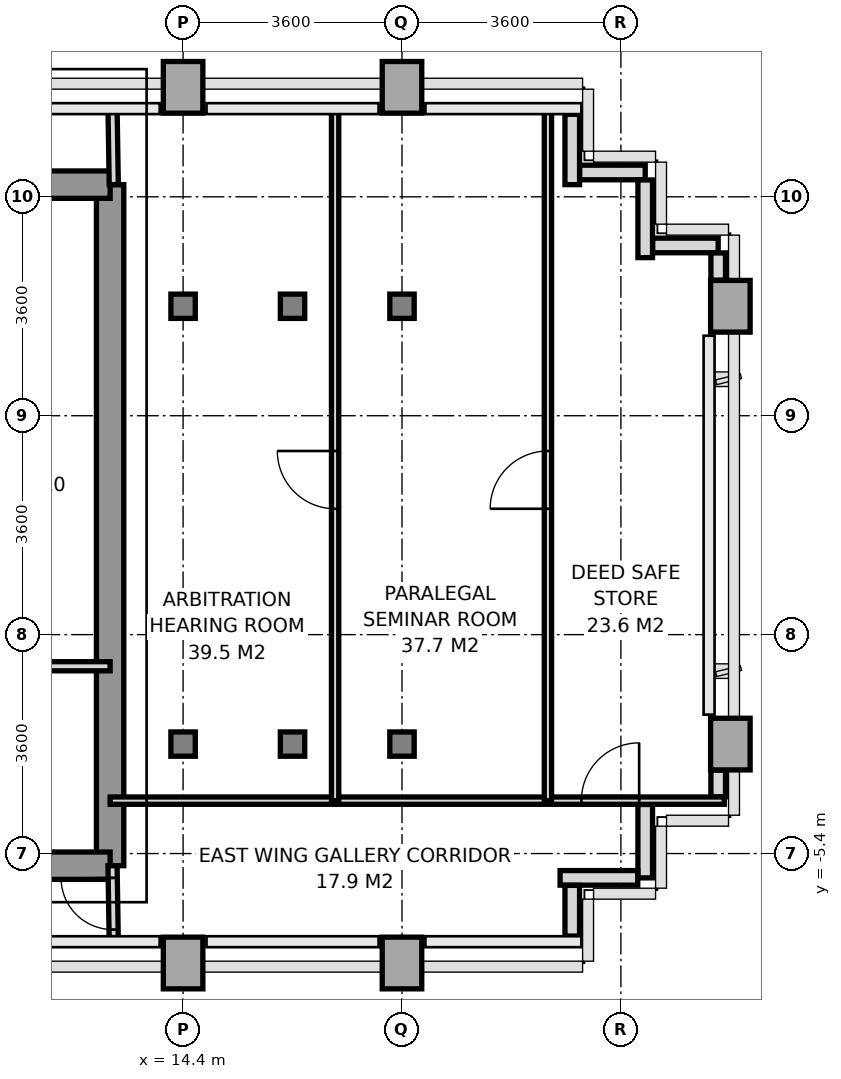
"""IFC4 building model, lengths in metres.
Left out: names, types, materials, properties, quantities, classifications, styles, units other than length and angle.
Written with IfcOpenShell. Run it as: python <this file> out.ifc"""

import sys

from ifc_helpers import new_model, si_unit, direction, frame, frame_2d, origin, origin_2d, place, context, subcontext, project, spatial, rectangle, i_section, extrude, source, transform, mapped, element, fill, save


model = new_model("IFC4")
c1 = context("Model", 3, precision=1e-05, world=origin(), true_north=direction((0.0, 1.0)))
c2 = subcontext(c1, "Body", "Model", "MODEL_VIEW")
j1 = project(units=[si_unit("LENGTHUNIT", "METRE"), si_unit("PLANEANGLEUNIT", "RADIAN")], contexts=[c1])
p1 = place(None, origin())
s1 = spatial("IfcSite", under=j1, at=p1, CompositionType="ELEMENT")
p2 = place(p1, origin())
s2 = spatial("IfcBuilding", under=s1, at=p2, CompositionType="ELEMENT")
p3 = place(p2, frame((0.0, 0.0, 134.6)))
s3 = spatial("IfcBuildingStorey", under=s2, at=p3, CompositionType="ELEMENT", Elevation=134.6)
m1 = source(origin(), c2, "Body", "SweptSolid", [
    extrude(rectangle(XDim=0.65, YDim=0.85, at=origin_2d()), origin(), (0.0, 0.0, 1.0), 3.2),
])
p4 = place(p3, frame((14.4, -7.2, 0.0), z_axis=(0.0, 0.0, 1.0), x_axis=(1.0, 0.0, 0.0)))
e1 = element("IfcColumn", 1, at=p4, inside=s3, PredefinedType="COLUMN", context=c2, shape_type="MappedRepresentation", body=[
    mapped(m1, transform((0.0, 0.0, 0.0), x_axis=(1.0, 0.0, 0.0), y_axis=(0.0, 1.0, 0.0), z_axis=(0.0, 0.0, 1.0), scale=1.0)),
])
m2 = source(origin(), c2, "Body", "SweptSolid", [
    extrude(i_section(OverallWidth=0.401, OverallDepth=0.399, WebThickness=0.02, FlangeThickness=0.032, at=origin_2d()), origin(), (0.0, 0.0, 1.0), 3.2),
])
for number, where, z_axis, x_axis in (
    (2, (14.4, -3.6, 0.0), (0.0, 0.0, 1.0), (1.0, 0.0, 0.0)),
    (3, (14.4, 3.6, 0.0), (0.0, 0.0, 1.0), (1.0, 0.0, 0.0)),
):
    element("IfcColumn", number, at=place(p3, frame(where, z_axis=z_axis, x_axis=x_axis)), inside=s3, PredefinedType="COLUMN", context=c2, shape_type="MappedRepresentation", body=[
        mapped(m2, transform((0.0, 0.0, 0.0), x_axis=(1.0, 0.0, 0.0), y_axis=(0.0, 1.0, 0.0), z_axis=(0.0, 0.0, 1.0), scale=1.0)),
    ])
p5 = place(p3, frame((14.4, 7.2, 0.0), z_axis=(0.0, 0.0, 1.0), x_axis=(1.0, 0.0, 0.0)))
e4 = element("IfcColumn", 4, at=p5, inside=s3, PredefinedType="COLUMN", context=c2, shape_type="MappedRepresentation", body=[
    mapped(m1, transform((0.0, 0.0, 0.0), x_axis=(1.0, 0.0, 0.0), y_axis=(0.0, 1.0, 0.0), z_axis=(0.0, 0.0, 1.0), scale=1.0)),
])
for number, where, z_axis, x_axis in (
    (5, (16.2, -3.6, 0.0), (0.0, 0.0, 1.0), (1.0, 0.0, 0.0)),
    (6, (16.2, 3.6, 0.0), (0.0, 0.0, 1.0), (1.0, 0.0, 0.0)),
):
    element("IfcColumn", number, at=place(p3, frame(where, z_axis=z_axis, x_axis=x_axis)), inside=s3, PredefinedType="COLUMN", context=c2, shape_type="MappedRepresentation", body=[
        mapped(m2, transform((0.0, 0.0, 0.0), x_axis=(1.0, 0.0, 0.0), y_axis=(0.0, 1.0, 0.0), z_axis=(0.0, 0.0, 1.0), scale=1.0)),
    ])
p6 = place(p3, frame((18.0, -7.2, 0.0), z_axis=(0.0, 0.0, 1.0), x_axis=(1.0, 0.0, 0.0)))
e7 = element("IfcColumn", 7, at=p6, inside=s3, PredefinedType="COLUMN", context=c2, shape_type="MappedRepresentation", body=[
    mapped(m1, transform((0.0, 0.0, 0.0), x_axis=(1.0, 0.0, 0.0), y_axis=(0.0, 1.0, 0.0), z_axis=(0.0, 0.0, 1.0), scale=1.0)),
])
for number, where, z_axis, x_axis in (
    (8, (18.0, -3.6, 0.0), (0.0, 0.0, 1.0), (1.0, 0.0, 0.0)),
    (9, (18.0, 3.6, 0.0), (0.0, 0.0, 1.0), (1.0, 0.0, 0.0)),
):
    element("IfcColumn", number, at=place(p3, frame(where, z_axis=z_axis, x_axis=x_axis)), inside=s3, PredefinedType="COLUMN", context=c2, shape_type="MappedRepresentation", body=[
        mapped(m2, transform((0.0, 0.0, 0.0), x_axis=(1.0, 0.0, 0.0), y_axis=(0.0, 1.0, 0.0), z_axis=(0.0, 0.0, 1.0), scale=1.0)),
    ])
for number, where, z_axis, x_axis in (
    (10, (18.0, 7.2, 0.0), (0.0, 0.0, 1.0), (1.0, 0.0, 0.0)),
    (11, (23.4, -3.6, 0.0), (0.0, 0.0, 1.0), (1.0, 0.0, 0.0)),
    (12, (23.4, 3.6, 0.0), (0.0, 0.0, 1.0), (1.0, 0.0, 0.0)),
):
    element("IfcColumn", number, at=place(p3, frame(where, z_axis=z_axis, x_axis=x_axis)), inside=s3, PredefinedType="COLUMN", context=c2, shape_type="MappedRepresentation", body=[
        mapped(m1, transform((0.0, 0.0, 0.0), x_axis=(1.0, 0.0, 0.0), y_axis=(0.0, 1.0, 0.0), z_axis=(0.0, 0.0, 1.0), scale=1.0)),
    ])
p7 = place(p3, frame((22.0, -4.593, 0.0), z_axis=(0.0, 0.0, 1.0), x_axis=(0.0, -1.0, 0.0)))
e13 = element("IfcWall", 13, at=p7, inside=s3, PredefinedType="PARAPET", context=c2, shape_type="SweptSolid", body=[
    extrude(rectangle(XDim=1.207, YDim=0.24, at=frame_2d((0.604, 0.0))), origin(), (0.0, 0.0, 1.0), 1.15),
])
p8 = place(p3, frame((21.877, -5.8, 0.0), z_axis=(0.0, 0.0, 1.0), x_axis=(-1.0, 0.0, 0.0)))
e14 = element("IfcWall", 14, at=p8, inside=s3, PredefinedType="PARAPET", context=c2, shape_type="SweptSolid", body=[
    extrude(rectangle(XDim=1.277, YDim=0.24, at=frame_2d((0.638, 0.0))), origin(), (0.0, 0.0, 1.0), 1.15),
])
p9 = place(p3, frame((20.8, -5.923, 0.0), z_axis=(0.0, 0.0, 1.0), x_axis=(0.0, -1.0, 0.0)))
e15 = element("IfcWall", 15, at=p9, inside=s3, PredefinedType="PARAPET", context=c2, shape_type="SweptSolid", body=[
    extrude(rectangle(XDim=0.834, YDim=0.24, at=frame_2d((0.417, 0.0))), origin(), (0.0, 0.0, 1.0), 1.15),
])
p10 = place(p3, frame((20.8, 6.757, 0.0), z_axis=(0.0, 0.0, 1.0), x_axis=(0.0, -1.0, 0.0)))
e16 = element("IfcWall", 16, at=p10, inside=s3, PredefinedType="PARAPET", context=c2, shape_type="SweptSolid", body=[
    extrude(rectangle(XDim=1.157, YDim=0.24, at=frame_2d((0.579, 0.0))), origin(), (0.0, 0.0, 1.0), 1.15),
])
p11 = place(p3, frame((20.923, 5.8, 0.0), z_axis=(0.0, 0.0, 1.0), x_axis=(1.0, 0.0, 0.0)))
e17 = element("IfcWall", 17, at=p11, inside=s3, PredefinedType="PARAPET", context=c2, shape_type="SweptSolid", body=[
    extrude(rectangle(XDim=1.077, YDim=0.24, at=frame_2d((0.539, 0.0))), origin(), (0.0, 0.0, 1.0), 1.15),
])
p12 = place(p3, frame((22.0, 5.677, 0.0), z_axis=(0.0, 0.0, 1.0), x_axis=(0.0, -1.0, 0.0)))
e18 = element("IfcWall", 18, at=p12, inside=s3, PredefinedType="PARAPET", context=c2, shape_type="SweptSolid", body=[
    extrude(rectangle(XDim=1.277, YDim=0.24, at=frame_2d((0.639, 0.0))), origin(), (0.0, 0.0, 1.0), 1.15),
])
p13 = place(p3, frame((22.123, 4.6, 0.0), z_axis=(0.0, 0.0, 1.0), x_axis=(1.0, 0.0, 0.0)))
e19 = element("IfcWall", 19, at=p13, inside=s3, PredefinedType="PARAPET", context=c2, shape_type="SweptSolid", body=[
    extrude(rectangle(XDim=1.077, YDim=0.24, at=frame_2d((0.539, 0.0))), origin(), (0.0, 0.0, 1.0), 1.15),
])
p14 = place(p3, frame((23.2, 4.477, 0.0), z_axis=(0.0, 0.0, 1.0), x_axis=(0.0, -1.0, 0.0)))
e20 = element("IfcWall", 20, at=p14, inside=s3, PredefinedType="PARAPET", context=c2, shape_type="SweptSolid", body=[
    extrude(rectangle(XDim=0.449, YDim=0.24, at=frame_2d((0.225, 0.0))), origin(), (0.0, 0.0, 1.0), 1.15),
])
p15 = place(p3, frame((23.2, -4.028, 0.0), z_axis=(0.0, 0.0, 1.0), x_axis=(0.0, -1.0, 0.0)))
e21 = element("IfcWall", 21, at=p15, inside=s3, PredefinedType="PARAPET", context=c2, shape_type="SweptSolid", body=[
    extrude(rectangle(XDim=0.439, YDim=0.24, at=frame_2d((0.219, 0.0))), origin(), (0.0, 0.0, 1.0), 1.15),
])
p16 = place(p3, frame((13.2, -5.6, 0.0), z_axis=(0.0, 0.0, 1.0), x_axis=(0.0, 1.0, 0.0)))
e22 = element("IfcWall", 22, at=p16, inside=s3, PredefinedType="SHEAR", context=c2, shape_type="SweptSolid", body=[
    extrude(rectangle(XDim=11.2, YDim=0.45, at=frame_2d((5.6, 0.0))), origin(), (0.0, 0.0, 1.0), 3.2),
])
p17 = place(p3, frame((11.381, 5.6, 0.0), z_axis=(0.0, 0.0, 1.0), x_axis=(1.0, 0.0, 0.0)))
e23 = element("IfcWall", 23, at=p17, inside=s3, PredefinedType="SHEAR", context=c2, shape_type="SweptSolid", body=[
    extrude(rectangle(XDim=1.819, YDim=0.45, at=frame_2d((0.909, 0.0))), origin(), (0.0, 0.0, 1.0), 3.2),
])
p18 = place(p3, frame((5.4, -5.6, 0.0), z_axis=(0.0, 0.0, 1.0), x_axis=(1.0, 0.0, 0.0)))
e24 = element("IfcWall", 24, at=p18, inside=s3, PredefinedType="SHEAR", context=c2, shape_type="SweptSolid", body=[
    extrude(rectangle(XDim=7.8, YDim=0.45, at=frame_2d((3.9, 0.0))), origin(), (0.0, 0.0, 1.0), 3.2),
])
p19 = place(p18, frame((3.0, 0.0, 0.0)))
e25 = element("IfcOpeningElement", 25, at=p19, cuts=e24, PredefinedType="OPENING", context=c2, shape_type="SweptSolid", body=[
    extrude(rectangle(XDim=1.2, YDim=2.2, at=frame_2d((0.6, 1.1))), frame((0.0, 0.235, 0.0), z_axis=(0.0, -1.0, 0.0), x_axis=(1.0, 0.0, 0.0)), (0.0, 0.0, 1.0), 0.47),
])
p20 = place(p18, frame((5.85, 0.0, 0.0)))
e26 = element("IfcOpeningElement", 26, at=p20, cuts=e24, PredefinedType="OPENING", context=c2, shape_type="SweptSolid", body=[
    extrude(rectangle(XDim=0.8, YDim=2.1, at=frame_2d((0.4, 1.05))), frame((0.0, 0.235, 0.0), z_axis=(0.0, -1.0, 0.0), x_axis=(1.0, 0.0, 0.0)), (0.0, 0.0, 1.0), 0.47),
])
p21 = place(p3, frame((11.02, -2.32, 0.0), z_axis=(0.0, 0.0, 1.0), x_axis=(1.0, 0.0, 0.0)))
e27 = element("IfcWall", 27, at=p21, inside=s3, PredefinedType="PARTITIONING", context=c2, shape_type="SweptSolid", body=[
    extrude(rectangle(XDim=2.18, YDim=0.15, at=frame_2d((1.09, 0.0))), origin(), (0.0, 0.0, 1.0), 3.2),
])
p22 = place(p3, frame((13.26, 5.6, 0.0), z_axis=(0.0, 0.0, 1.0), x_axis=(-0.016013571389, 0.999871774545, 0.0)))
e28 = element("IfcWall", 28, at=p22, inside=s3, PredefinedType="PARTITIONING", context=c2, shape_type="SweptSolid", body=[
    extrude(rectangle(XDim=1.25, YDim=0.15, at=frame_2d((0.625, 0.0))), origin(), (0.0, 0.0, 1.0), 3.2),
])
p23 = place(p3, frame((13.26, -6.85, 0.0), z_axis=(0.0, 0.0, 1.0), x_axis=(-0.016013571389, 0.999871774545, 0.0)))
e29 = element("IfcWall", 29, at=p23, inside=s3, PredefinedType="PARTITIONING", context=c2, shape_type="SweptSolid", body=[
    extrude(rectangle(XDim=1.25, YDim=0.15, at=frame_2d((0.625, 0.0))), origin(), (0.0, 0.0, 1.0), 3.2),
])
p24 = place(p23, frame((0.2, 0.0, 0.0)))
e30 = element("IfcOpeningElement", 30, at=p24, cuts=e29, PredefinedType="OPENING", context=c2, shape_type="SweptSolid", body=[
    extrude(rectangle(XDim=0.85, YDim=2.1, at=frame_2d((0.425, 1.05))), frame((0.0, 0.085, 0.0), z_axis=(0.0, -1.0, 0.0), x_axis=(1.0, 0.0, 0.0)), (0.0, 0.0, 1.0), 0.17),
])
p25 = place(p3, frame((13.2, -4.53, 0.0), z_axis=(0.0, 0.0, 1.0), x_axis=(1.0, 0.0, 0.0)))
e31 = element("IfcWall", 31, at=p25, inside=s3, PredefinedType="PARTITIONING", context=c2, shape_type="SweptSolid", body=[
    extrude(rectangle(XDim=10.1, YDim=0.12, at=frame_2d((5.05, 0.0))), origin(), (0.0, 0.0, 1.0), 2.75),
])
p26 = place(p25, frame((7.75, 0.0, 0.0)))
e32 = element("IfcOpeningElement", 32, at=p26, cuts=e31, PredefinedType="OPENING", context=c2, shape_type="SweptSolid", body=[
    extrude(rectangle(XDim=0.95, YDim=2.15, at=frame_2d((0.475, 1.075))), frame((0.0, 0.07, 0.0), z_axis=(0.0, -1.0, 0.0), x_axis=(1.0, 0.0, 0.0)), (0.0, 0.0, 1.0), 0.14),
])
p27 = place(p3, frame((16.9, -4.53, 0.0), z_axis=(0.0, 0.0, 1.0), x_axis=(0.0, 1.0, 0.0)))
e33 = element("IfcWall", 33, at=p27, inside=s3, PredefinedType="PARTITIONING", context=c2, shape_type="SweptSolid", body=[
    extrude(rectangle(XDim=11.38, YDim=0.12, at=frame_2d((5.69, 0.0))), origin(), (0.0, 0.0, 1.0), 2.7),
])
p28 = place(p27, frame((4.8, 0.0, 0.0)))
e34 = element("IfcOpeningElement", 34, at=p28, cuts=e33, PredefinedType="OPENING", context=c2, shape_type="SweptSolid", body=[
    extrude(rectangle(XDim=0.95, YDim=2.15, at=frame_2d((0.475, 1.075))), frame((0.0, 0.07, 0.0), z_axis=(0.0, -1.0, 0.0), x_axis=(1.0, 0.0, 0.0)), (0.0, 0.0, 1.0), 0.14),
])
p29 = place(p3, frame((20.4, -4.53, 0.0), z_axis=(0.0, 0.0, 1.0), x_axis=(0.0, 1.0, 0.0)))
e35 = element("IfcWall", 35, at=p29, inside=s3, PredefinedType="PARTITIONING", context=c2, shape_type="SweptSolid", body=[
    extrude(rectangle(XDim=11.38, YDim=0.12, at=frame_2d((5.69, 0.0))), origin(), (0.0, 0.0, 1.0), 2.7),
])
p30 = place(p29, frame((4.8, 0.0, 0.0)))
e36 = element("IfcOpeningElement", 36, at=p30, cuts=e35, PredefinedType="OPENING", context=c2, shape_type="SweptSolid", body=[
    extrude(rectangle(XDim=0.95, YDim=2.15, at=frame_2d((0.475, 1.075))), frame((0.0, 0.07, 0.0), z_axis=(0.0, -1.0, 0.0), x_axis=(1.0, 0.0, 0.0)), (0.0, 0.0, 1.0), 0.14),
])
m3 = source(origin(), c2, "Body", "SweptSolid", [
    extrude(rectangle(XDim=0.85, YDim=2.1, at=frame_2d((0.425, 1.05))), frame((0.0, 0.025, 0.0), z_axis=(0.0, -1.0, 0.0), x_axis=(1.0, 0.0, 0.0)), (0.0, 0.0, 1.0), 0.05),
])
p31 = place(p24, origin())
e37 = element("IfcDoor", 37, at=p31, inside=s3, OperationType="SINGLE_SWING_RIGHT", PredefinedType="DOOR", context=c2, shape_type="MappedRepresentation", body=[
    mapped(m3, transform((0.0, 0.0, 0.0), x_axis=(1.0, 0.0, 0.0), y_axis=(0.0, 1.0, 0.0), z_axis=(0.0, 0.0, 1.0), scale=1.0)),
])
fill(e30, e37)
m4 = source(origin(), c2, "Body", "SweptSolid", [
    extrude(rectangle(XDim=0.95, YDim=2.15, at=frame_2d((0.475, 1.075))), frame((0.0, 0.025, 0.0), z_axis=(0.0, -1.0, 0.0), x_axis=(1.0, 0.0, 0.0)), (0.0, 0.0, 1.0), 0.05),
])
p32 = place(p28, origin())
e38 = element("IfcDoor", 38, at=p32, inside=s3, OperationType="SINGLE_SWING_RIGHT", PredefinedType="DOOR", context=c2, shape_type="MappedRepresentation", body=[
    mapped(m4, transform((0.0, 0.0, 0.0), x_axis=(1.0, 0.0, 0.0), y_axis=(0.0, 1.0, 0.0), z_axis=(0.0, 0.0, 1.0), scale=1.0)),
])
fill(e34, e38)
p33 = place(p30, origin())
e39 = element("IfcDoor", 39, at=p33, inside=s3, OperationType="SINGLE_SWING_LEFT", PredefinedType="DOOR", context=c2, shape_type="MappedRepresentation", body=[
    mapped(m4, transform((0.0, 0.0, 0.0), x_axis=(1.0, 0.0, 0.0), y_axis=(0.0, 1.0, 0.0), z_axis=(0.0, 0.0, 1.0), scale=1.0)),
])
fill(e36, e39)
p34 = place(p26, origin())
e40 = element("IfcDoor", 40, at=p34, inside=s3, OperationType="SINGLE_SWING_RIGHT", PredefinedType="DOOR", context=c2, shape_type="MappedRepresentation", body=[
    mapped(m4, transform((0.0, 0.0, 0.0), x_axis=(1.0, 0.0, 0.0), y_axis=(0.0, 1.0, 0.0), z_axis=(0.0, 0.0, 1.0), scale=1.0)),
])
fill(e32, e40)
save(model, sys.argv[1])
